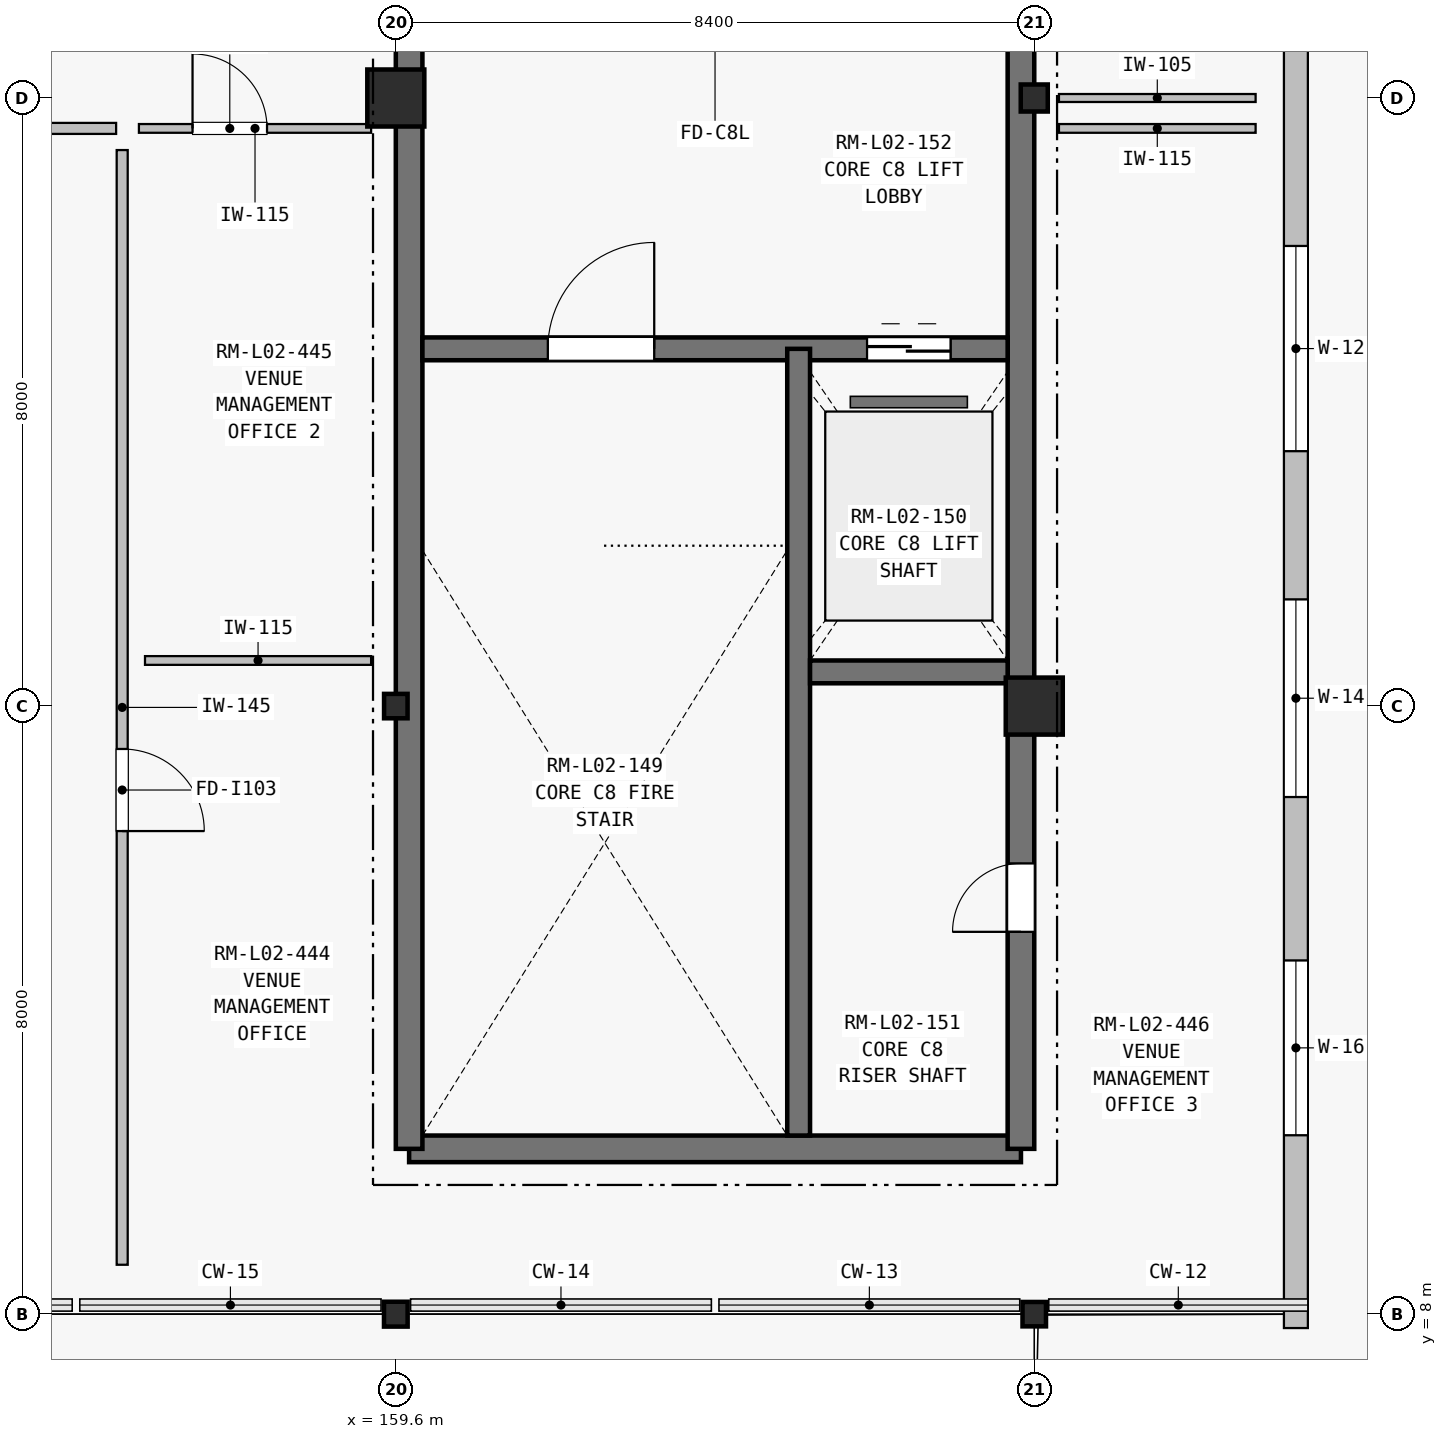
"""IFC4 building model, lengths in metres.
Left out: names, types, materials, properties, quantities, classifications, styles, units other than length and angle.
Written with IfcOpenShell. Run it as: python <this file> out.ifc"""

import sys

from ifc_helpers import new_model, si_unit, direction, frame, frame_2d, origin, origin_2d, place, context, subcontext, project, spatial, rectangle, hollow_circle, i_section, extrude, element, fill, save


model = new_model("IFC4")
c1 = context("Model", 3, precision=1e-05, world=origin(), true_north=direction((0.0, 1.0)))
c2 = subcontext(c1, "Body", "Model", "MODEL_VIEW")
j1 = project(units=[si_unit("LENGTHUNIT", "METRE"), si_unit("PLANEANGLEUNIT", "RADIAN")], contexts=[c1])
p1 = place(None, origin())
s1 = spatial("IfcSite", under=j1, at=p1, CompositionType="ELEMENT")
p2 = place(p1, origin())
s2 = spatial("IfcBuilding", under=s1, at=p2, CompositionType="ELEMENT")
p3 = place(p2, frame((0.0, 0.0, 9.9)))
s3 = spatial("IfcBuildingStorey", under=s2, at=p3, CompositionType="ELEMENT", Elevation=9.9)
p4 = place(p3, frame((159.6, 8.0, 0.0), z_axis=(0.0, 0.0, 1.0), x_axis=(1.0, 0.0, 0.0)))
e1 = element("IfcColumn", 1, at=p4, inside=s3, PredefinedType="COLUMN", context=c2, shape_type="SweptSolid", body=[
    extrude(i_section(OverallWidth=0.311, OverallDepth=0.327, WebThickness=0.016, FlangeThickness=0.025, at=origin_2d()), origin(), (0.0, 0.0, 1.0), 4.26),
])
p5 = place(p3, frame((159.6, 16.0, 0.0), z_axis=(0.0, 0.0, 1.0), x_axis=(1.0, 0.0, 0.0)))
e2 = element("IfcColumn", 2, at=p5, inside=s3, PredefinedType="COLUMN", context=c2, shape_type="SweptSolid", body=[
    extrude(i_section(OverallWidth=0.309, OverallDepth=0.321, WebThickness=0.014, FlangeThickness=0.022, at=origin_2d()), origin(), (0.0, 0.0, 1.0), 4.26),
])
p6 = place(p3, frame((159.6, 24.0, 0.0), z_axis=(0.0, 0.0, 1.0), x_axis=(1.0, 0.0, 0.0)))
e3 = element("IfcColumn", 3, at=p6, inside=s3, PredefinedType="COLUMN", context=c2, shape_type="SweptSolid", body=[
    extrude(rectangle(XDim=0.75, YDim=0.75, at=origin_2d()), origin(), (0.0, 0.0, 1.0), 4.26),
])
p7 = place(p3, frame((168.0, 8.0, 0.0), z_axis=(0.0, 0.0, 1.0), x_axis=(1.0, 0.0, 0.0)))
e4 = element("IfcColumn", 4, at=p7, inside=s3, PredefinedType="COLUMN", context=c2, shape_type="SweptSolid", body=[
    extrude(i_section(OverallWidth=0.309, OverallDepth=0.321, WebThickness=0.014, FlangeThickness=0.022, at=origin_2d()), origin(), (0.0, 0.0, 1.0), 4.26),
])
p8 = place(p3, frame((168.0, 16.0, 0.0), z_axis=(0.0, 0.0, 1.0), x_axis=(1.0, 0.0, 0.0)))
e5 = element("IfcColumn", 5, at=p8, inside=s3, PredefinedType="COLUMN", context=c2, shape_type="SweptSolid", body=[
    extrude(rectangle(XDim=0.75, YDim=0.75, at=origin_2d()), origin(), (0.0, 0.0, 1.0), 4.26),
])
p9 = place(p3, frame((168.0, 24.0, 0.0), z_axis=(0.0, 0.0, 1.0), x_axis=(1.0, 0.0, 0.0)))
e6 = element("IfcColumn", 6, at=p9, inside=s3, PredefinedType="COLUMN", context=c2, shape_type="SweptSolid", body=[
    extrude(hollow_circle(Radius=0.178, WallThickness=0.013, at=origin_2d()), origin(), (0.0, 0.0, 1.0), 4.26),
])
p10 = place(p3, frame((171.442, 46.954, 0.0), z_axis=(0.0, 0.0, 1.0), x_axis=(0.0, -1.0, 0.0)))
e7 = element("IfcWall", 7, at=p10, inside=s3, PredefinedType="SOLIDWALL", context=c2, shape_type="SweptSolid", body=[
    extrude(rectangle(XDim=39.136, YDim=0.315, at=frame_2d((19.568, 0.0))), origin(), (0.0, 0.0, 1.0), 4.26),
])
p11 = place(p10, frame((11.325, 0.0, 0.9)))
e8 = element("IfcOpeningElement", 8, at=p11, cuts=e7, PredefinedType="OPENING", context=c2, shape_type="SweptSolid", body=[
    extrude(rectangle(XDim=2.25, YDim=2.1, at=frame_2d((1.125, 1.05))), frame((0.0, 0.167, 0.0), z_axis=(0.0, -1.0, 0.0), x_axis=(1.0, 0.0, 0.0)), (0.0, 0.0, 1.0), 0.335),
])
p12 = place(p10, frame((16.075, 0.0, 0.9)))
e9 = element("IfcOpeningElement", 9, at=p12, cuts=e7, PredefinedType="OPENING", context=c2, shape_type="SweptSolid", body=[
    extrude(rectangle(XDim=1.95, YDim=2.0, at=frame_2d((0.975, 1.0))), frame((0.0, 0.167, 0.0), z_axis=(0.0, -1.0, 0.0), x_axis=(1.0, 0.0, 0.0)), (0.0, 0.0, 1.0), 0.335),
])
p13 = place(p10, frame((24.9, 0.0, 0.9)))
e10 = element("IfcOpeningElement", 10, at=p13, cuts=e7, PredefinedType="OPENING", context=c2, shape_type="SweptSolid", body=[
    extrude(rectangle(XDim=2.7, YDim=1.55, at=frame_2d((1.35, 0.775))), frame((0.0, 0.167, 0.0), z_axis=(0.0, -1.0, 0.0), x_axis=(1.0, 0.0, 0.0)), (0.0, 0.0, 1.0), 0.335),
])
p14 = place(p10, frame((29.55, 0.0, 0.9)))
e11 = element("IfcOpeningElement", 11, at=p14, cuts=e7, PredefinedType="OPENING", context=c2, shape_type="SweptSolid", body=[
    extrude(rectangle(XDim=2.6, YDim=1.4, at=frame_2d((1.3, 0.7))), frame((0.0, 0.167, 0.0), z_axis=(0.0, -1.0, 0.0), x_axis=(1.0, 0.0, 0.0)), (0.0, 0.0, 1.0), 0.335),
])
p15 = place(p10, frame((34.3, 0.0, 0.9)))
e12 = element("IfcOpeningElement", 12, at=p15, cuts=e7, PredefinedType="OPENING", context=c2, shape_type="SweptSolid", body=[
    extrude(rectangle(XDim=2.3, YDim=1.3, at=frame_2d((1.15, 0.65))), frame((0.0, 0.167, 0.0), z_axis=(0.0, -1.0, 0.0), x_axis=(1.0, 0.0, 0.0)), (0.0, 0.0, 1.0), 0.335),
])
p16 = place(p3, frame((159.775, 10.175, 0.0), z_axis=(0.0, 0.0, 1.0), x_axis=(1.0, 0.0, 0.0)))
e13 = element("IfcWall", 13, at=p16, inside=s3, PredefinedType="SHEAR", context=c2, shape_type="SweptSolid", body=[
    extrude(rectangle(XDim=8.05, YDim=0.35, at=frame_2d((4.025, 0.0))), origin(), (0.0, 0.0, 1.0), 4.5),
])
p17 = place(p3, frame((159.775, 10.175, 0.0), z_axis=(0.0, 0.0, 1.0), x_axis=(0.0, 1.0, 0.0)))
e14 = element("IfcWall", 14, at=p17, inside=s3, PredefinedType="SHEAR", context=c2, shape_type="SweptSolid", body=[
    extrude(rectangle(XDim=14.85, YDim=0.35, at=frame_2d((7.425, 0.0))), origin(), (0.0, 0.0, 1.0), 4.5),
])
p18 = place(p3, frame((167.825, 10.175, 0.0), z_axis=(0.0, 0.0, 1.0), x_axis=(0.0, 1.0, 0.0)))
e15 = element("IfcWall", 15, at=p18, inside=s3, PredefinedType="SHEAR", context=c2, shape_type="SweptSolid", body=[
    extrude(rectangle(XDim=14.85, YDim=0.35, at=frame_2d((7.425, 0.0))), origin(), (0.0, 0.0, 1.0), 4.5),
])
p19 = place(p18, frame((2.855, 0.0, 0.0)))
e16 = element("IfcOpeningElement", 16, at=p19, cuts=e15, PredefinedType="OPENING", context=c2, shape_type="SweptSolid", body=[
    extrude(rectangle(XDim=0.9, YDim=2.1, at=frame_2d((0.45, 1.05))), frame((0.0, 0.185, 0.0), z_axis=(0.0, -1.0, 0.0), x_axis=(1.0, 0.0, 0.0)), (0.0, 0.0, 1.0), 0.37),
])
p20 = place(p3, frame((159.95, 20.7, 0.0), z_axis=(0.0, 0.0, 1.0), x_axis=(1.0, 0.0, 0.0)))
e17 = element("IfcWall", 17, at=p20, inside=s3, PredefinedType="SHEAR", context=c2, shape_type="SweptSolid", body=[
    extrude(rectangle(XDim=7.7, YDim=0.3, at=frame_2d((3.85, 0.0))), origin(), (0.0, 0.0, 1.0), 4.5),
])
p21 = place(p20, frame((1.65, 0.0, 0.0)))
e18 = element("IfcOpeningElement", 18, at=p21, cuts=e17, PredefinedType="OPENING", context=c2, shape_type="SweptSolid", body=[
    extrude(rectangle(XDim=1.4, YDim=2.2, at=frame_2d((0.7, 1.1))), frame((0.0, 0.16, 0.0), z_axis=(0.0, -1.0, 0.0), x_axis=(1.0, 0.0, 0.0)), (0.0, 0.0, 1.0), 0.32),
])
p22 = place(p20, frame((5.85, 0.0, 0.0)))
e19 = element("IfcOpeningElement", 19, at=p22, cuts=e17, PredefinedType="OPENING", context=c2, shape_type="SweptSolid", body=[
    extrude(rectangle(XDim=1.1, YDim=2.2, at=frame_2d((0.55, 1.1))), frame((0.0, 0.16, 0.0), z_axis=(0.0, -1.0, 0.0), x_axis=(1.0, 0.0, 0.0)), (0.0, 0.0, 1.0), 0.32),
])
p23 = place(p3, frame((164.9, 10.35, 0.0), z_axis=(0.0, 0.0, 1.0), x_axis=(0.0, 1.0, 0.0)))
e20 = element("IfcWall", 20, at=p23, inside=s3, PredefinedType="SHEAR", context=c2, shape_type="SweptSolid", body=[
    extrude(rectangle(XDim=10.35, YDim=0.3, at=frame_2d((5.175, 0.0))), origin(), (0.0, 0.0, 1.0), 4.5),
])
p24 = place(p3, frame((165.05, 16.45, 0.0), z_axis=(0.0, 0.0, 1.0), x_axis=(1.0, 0.0, 0.0)))
e21 = element("IfcWall", 21, at=p24, inside=s3, PredefinedType="SHEAR", context=c2, shape_type="SweptSolid", body=[
    extrude(rectangle(XDim=2.6, YDim=0.3, at=frame_2d((1.3, 0.0))), origin(), (0.0, 0.0, 1.0), 4.5),
])
p25 = place(p3, frame((170.913, 24.0, 0.0), z_axis=(0.0, 0.0, 1.0), x_axis=(-1.0, 0.0, 0.0)))
e22 = element("IfcWall", 22, at=p25, inside=s3, PredefinedType="PARTITIONING", context=c2, shape_type="SweptSolid", body=[
    extrude(rectangle(XDim=2.588, YDim=0.105, at=frame_2d((1.294, 0.0))), origin(), (0.0, 0.0, 1.0), 4.26),
])
p26 = place(p3, frame((136.325, 23.6, 0.0), z_axis=(0.0, 0.0, 1.0), x_axis=(1.0, 0.0, 0.0)))
e23 = element("IfcWall", 23, at=p26, inside=s3, PredefinedType="PARTITIONING", context=c2, shape_type="SweptSolid", body=[
    extrude(rectangle(XDim=19.595, YDim=0.145, at=frame_2d((9.797, 0.0))), origin(), (0.0, 0.0, 1.0), 3.245),
])
p27 = place(p26, frame((13.39, 0.0, 0.0)))
e24 = element("IfcOpeningElement", 24, at=p27, cuts=e23, PredefinedType="OPENING", context=c2, shape_type="SweptSolid", body=[
    extrude(rectangle(XDim=1.5, YDim=2.2, at=frame_2d((0.75, 1.1))), frame((0.0, 0.083, 0.0), z_axis=(0.0, -1.0, 0.0), x_axis=(1.0, 0.0, 0.0)), (0.0, 0.0, 1.0), 0.165),
])
p28 = place(p3, frame((156.0, 23.315, 0.0), z_axis=(0.0, 0.0, 1.0), x_axis=(0.0, -1.0, 0.0)))
e25 = element("IfcWall", 25, at=p28, inside=s3, PredefinedType="PARTITIONING", context=c2, shape_type="SweptSolid", body=[
    extrude(rectangle(XDim=14.665, YDim=0.145, at=frame_2d((7.333, 0.0))), origin(), (0.0, 0.0, 1.0), 3.325),
])
p29 = place(p28, frame((7.879, 0.0, 0.0)))
e26 = element("IfcOpeningElement", 26, at=p29, cuts=e25, PredefinedType="OPENING", context=c2, shape_type="SweptSolid", body=[
    extrude(rectangle(XDim=1.08, YDim=2.15, at=frame_2d((0.54, 1.075))), frame((0.0, 0.083, 0.0), z_axis=(0.0, -1.0, 0.0), x_axis=(1.0, 0.0, 0.0)), (0.0, 0.0, 1.0), 0.165),
])
p30 = place(p3, frame((156.3, 16.6, 0.0), z_axis=(0.0, 0.0, 1.0), x_axis=(1.0, 0.0, 0.0)))
e27 = element("IfcWall", 27, at=p30, inside=s3, PredefinedType="PARTITIONING", context=c2, shape_type="SweptSolid", body=[
    extrude(rectangle(XDim=2.975, YDim=0.115, at=frame_2d((1.487, 0.0))), origin(), (0.0, 0.0, 1.0), 4.26),
])
p31 = place(p3, frame((156.22, 23.6, 0.0), z_axis=(0.0, 0.0, 1.0), x_axis=(1.0, 0.0, 0.0)))
e28 = element("IfcWall", 28, at=p31, inside=s3, PredefinedType="PARTITIONING", context=c2, shape_type="SweptSolid", body=[
    extrude(rectangle(XDim=3.055, YDim=0.115, at=frame_2d((1.527, 0.0))), origin(), (0.0, 0.0, 1.0), 4.26),
])
p32 = place(p31, frame((0.706, 0.0, 0.0)))
e29 = element("IfcOpeningElement", 29, at=p32, cuts=e28, PredefinedType="OPENING", context=c2, shape_type="SweptSolid", body=[
    extrude(rectangle(XDim=0.98, YDim=2.15, at=frame_2d((0.49, 1.075))), frame((0.0, 0.067, 0.0), z_axis=(0.0, -1.0, 0.0), x_axis=(1.0, 0.0, 0.0)), (0.0, 0.0, 1.0), 0.135),
])
p33 = place(p3, frame((168.325, 23.6, 0.0), z_axis=(0.0, 0.0, 1.0), x_axis=(1.0, 0.0, 0.0)))
e30 = element("IfcWall", 30, at=p33, inside=s3, PredefinedType="PARTITIONING", context=c2, shape_type="SweptSolid", body=[
    extrude(rectangle(XDim=2.588, YDim=0.115, at=frame_2d((1.294, 0.0))), origin(), (0.0, 0.0, 1.0), 4.26),
])
p34 = place(p13, origin())
e31 = element("IfcWindow", 31, at=p34, inside=s3, PartitioningType="SINGLE_PANEL", PredefinedType="WINDOW", context=c2, shape_type="SweptSolid", body=[
    extrude(rectangle(XDim=2.7, YDim=1.55, at=frame_2d((1.35, 0.775))), frame((0.0, 0.03, 0.0), z_axis=(0.0, -1.0, 0.0), x_axis=(1.0, 0.0, 0.0)), (0.0, 0.0, 1.0), 0.06),
])
fill(e10, e31)
p35 = place(p14, origin())
e32 = element("IfcWindow", 32, at=p35, inside=s3, PartitioningType="SINGLE_PANEL", PredefinedType="WINDOW", context=c2, shape_type="SweptSolid", body=[
    extrude(rectangle(XDim=2.6, YDim=1.4, at=frame_2d((1.3, 0.7))), frame((0.0, 0.03, 0.0), z_axis=(0.0, -1.0, 0.0), x_axis=(1.0, 0.0, 0.0)), (0.0, 0.0, 1.0), 0.06),
])
fill(e11, e32)
p36 = place(p15, origin())
e33 = element("IfcWindow", 33, at=p36, inside=s3, PartitioningType="SINGLE_PANEL", PredefinedType="WINDOW", context=c2, shape_type="SweptSolid", body=[
    extrude(rectangle(XDim=2.3, YDim=1.3, at=frame_2d((1.15, 0.65))), frame((0.0, 0.03, 0.0), z_axis=(0.0, -1.0, 0.0), x_axis=(1.0, 0.0, 0.0)), (0.0, 0.0, 1.0), 0.06),
])
fill(e12, e33)
p37 = place(p21, origin())
e34 = element("IfcDoor", 34, at=p37, inside=s3, OperationType="SINGLE_SWING_RIGHT", PredefinedType="DOOR", context=c2, shape_type="SweptSolid", body=[
    extrude(rectangle(XDim=1.4, YDim=2.2, at=frame_2d((0.7, 1.1))), frame((0.0, 0.025, 0.0), z_axis=(0.0, -1.0, 0.0), x_axis=(1.0, 0.0, 0.0)), (0.0, 0.0, 1.0), 0.05),
])
fill(e18, e34)
p38 = place(p19, origin())
e35 = element("IfcDoor", 35, at=p38, inside=s3, OperationType="SINGLE_SWING_LEFT", PredefinedType="DOOR", context=c2, shape_type="SweptSolid", body=[
    extrude(rectangle(XDim=0.9, YDim=2.1, at=frame_2d((0.45, 1.05))), frame((0.0, 0.025, 0.0), z_axis=(0.0, -1.0, 0.0), x_axis=(1.0, 0.0, 0.0)), (0.0, 0.0, 1.0), 0.05),
])
fill(e16, e35)
p39 = place(p22, origin())
e36 = element("IfcDoor", 36, at=p39, inside=s3, OperationType="SLIDING_TO_LEFT", PredefinedType="DOOR", context=c2, shape_type="SweptSolid", body=[
    extrude(rectangle(XDim=1.1, YDim=2.2, at=frame_2d((0.55, 1.1))), frame((0.0, 0.025, 0.0), z_axis=(0.0, -1.0, 0.0), x_axis=(1.0, 0.0, 0.0)), (0.0, 0.0, 1.0), 0.05),
])
fill(e19, e36)
p40 = place(p29, origin())
e37 = element("IfcDoor", 37, at=p40, inside=s3, OperationType="SINGLE_SWING_RIGHT", PredefinedType="DOOR", context=c2, shape_type="SweptSolid", body=[
    extrude(rectangle(XDim=1.08, YDim=2.15, at=frame_2d((0.54, 1.075))), frame((0.0, 0.025, 0.0), z_axis=(0.0, -1.0, 0.0), x_axis=(1.0, 0.0, 0.0)), (0.0, 0.0, 1.0), 0.05),
])
fill(e26, e37)
p41 = place(p32, origin())
e38 = element("IfcDoor", 38, at=p41, inside=s3, OperationType="SINGLE_SWING_LEFT", PredefinedType="DOOR", context=c2, shape_type="SweptSolid", body=[
    extrude(rectangle(XDim=0.98, YDim=2.15, at=frame_2d((0.49, 1.075))), frame((0.0, 0.025, 0.0), z_axis=(0.0, -1.0, 0.0), x_axis=(1.0, 0.0, 0.0)), (0.0, 0.0, 1.0), 0.05),
])
fill(e29, e38)
save(model, sys.argv[1])
